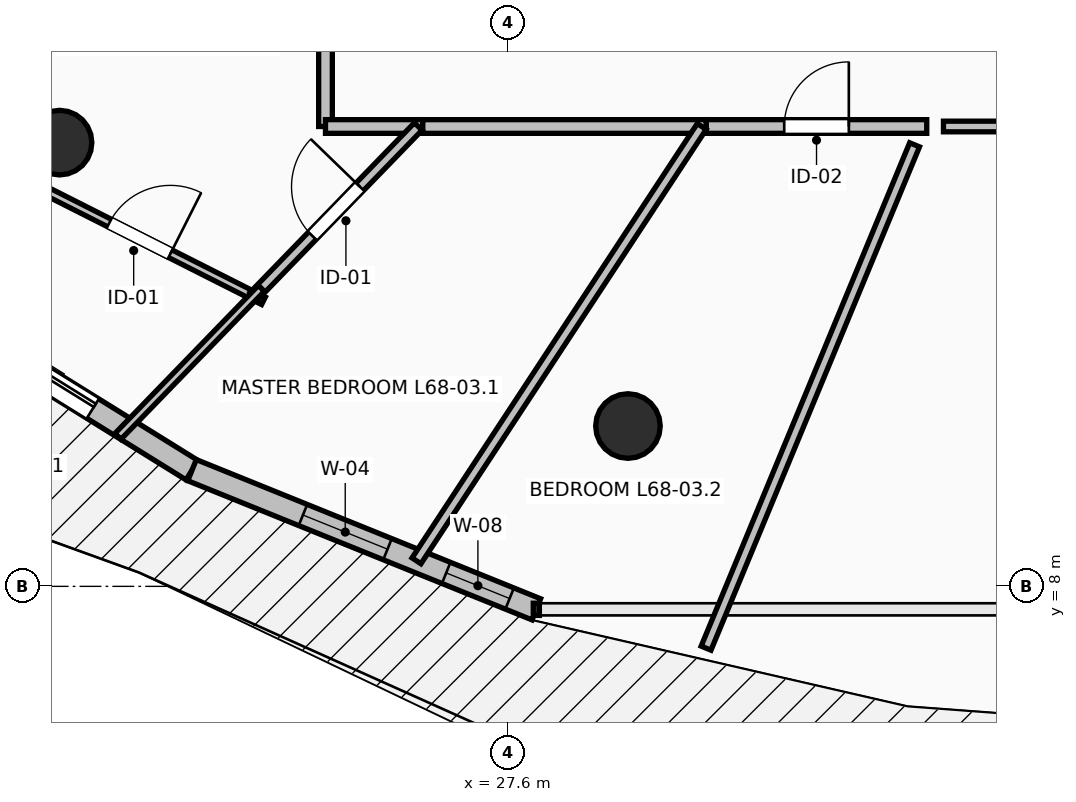
"""IFC4 building model, lengths in metres.
Left out: names, types, materials, properties, quantities, classifications, styles, units other than length and angle.
Written with IfcOpenShell. Run it as: python <this file> out.ifc"""

import sys

from ifc_helpers import new_model, si_unit, direction, frame, frame_2d, origin, origin_2d, place, context, subcontext, project, spatial, rectangle, circle, extrude, element, fill, save


model = new_model("IFC4")
c1 = context("Model", 3, precision=1e-05, world=origin(), true_north=direction((0.0, 1.0)))
c2 = subcontext(c1, "Body", "Model", "MODEL_VIEW")
j1 = project(units=[si_unit("LENGTHUNIT", "METRE"), si_unit("PLANEANGLEUNIT", "RADIAN")], contexts=[c1])
p1 = place(None, origin())
s1 = spatial("IfcSite", under=j1, at=p1, CompositionType="ELEMENT")
p2 = place(p1, origin())
s2 = spatial("IfcBuilding", under=s1, at=p2, CompositionType="ELEMENT")
p3 = place(p2, frame((0.0, 0.0, 252.0)))
s3 = spatial("IfcBuildingStorey", under=s2, at=p3, CompositionType="ELEMENT", Elevation=252.0)
for number, where, z_axis, x_axis in (
    (1, (21.701, 13.838, 0.0), (0.0, 0.0, 1.0), (-0.707, -0.707, 0.0)),
    (2, (29.179, 10.109, 0.0), (0.0, 0.0, 1.0), (-0.383, -0.924, 0.0)),
):
    element("IfcColumn", number, at=place(p3, frame(where, z_axis=z_axis, x_axis=x_axis)), inside=s3, PredefinedType="COLUMN", context=c2, shape_type="SweptSolid", body=[
        extrude(circle(Radius=0.425, at=origin_2d()), origin(), (0.0, 0.0, 1.0), 3.55),
    ])
p4 = place(p3, frame((19.474, 11.992, 0.0), z_axis=(0.0, 0.0, 1.0), x_axis=(0.849702323036, -0.527262707032, 0.0)))
e3 = element("IfcWall", 3, at=p4, inside=s3, PredefinedType="STANDARD", context=c2, shape_type="SweptSolid", body=[
    extrude(rectangle(XDim=4.672, YDim=0.3, at=frame_2d((2.336, 0.0))), origin(), (0.0, 0.0, 1.0), 3.29),
])
p5 = place(p4, frame((1.536, 0.0, 0.0)))
e4 = element("IfcOpeningElement", 4, at=p5, cuts=e3, PredefinedType="OPENING", context=c2, shape_type="SweptSolid", body=[
    extrude(rectangle(XDim=1.6, YDim=2.3, at=frame_2d((0.8, 1.15))), frame((0.0, 0.165, 0.0), z_axis=(0.0, -1.0, 0.0), x_axis=(1.0, 0.0, 0.0)), (0.0, 0.0, 1.0), 0.33),
])
p6 = place(p3, frame((23.444, 9.529, 0.0), z_axis=(0.0, 0.0, 1.0), x_axis=(0.927147375511, -0.374696869594, 0.0)))
e5 = element("IfcWall", 5, at=p6, inside=s3, PredefinedType="STANDARD", context=c2, shape_type="SweptSolid", body=[
    extrude(rectangle(XDim=4.885, YDim=0.3, at=frame_2d((2.443, 0.0))), origin(), (0.0, 0.0, 1.0), 3.29),
])
p7 = place(p6, frame((1.574, 0.0, 0.85)))
e6 = element("IfcOpeningElement", 6, at=p7, cuts=e5, PredefinedType="OPENING", context=c2, shape_type="SweptSolid", body=[
    extrude(rectangle(XDim=1.2, YDim=1.95, at=frame_2d((0.6, 0.975))), frame((0.0, 0.165, 0.0), z_axis=(0.0, -1.0, 0.0), x_axis=(1.0, 0.0, 0.0)), (0.0, 0.0, 1.0), 0.33),
])
p8 = place(p6, frame((3.606, 0.0, 0.85)))
e7 = element("IfcOpeningElement", 7, at=p8, cuts=e5, PredefinedType="OPENING", context=c2, shape_type="SweptSolid", body=[
    extrude(rectangle(XDim=0.9, YDim=1.8, at=frame_2d((0.45, 0.9))), frame((0.0, 0.165, 0.0), z_axis=(0.0, -1.0, 0.0), x_axis=(1.0, 0.0, 0.0)), (0.0, 0.0, 1.0), 0.33),
])
p9 = place(p3, frame((25.2, 17.812, 0.0), z_axis=(0.0, 0.0, 1.0), x_axis=(0.0, -1.0, 0.0)))
e8 = element("IfcWall", 8, at=p9, inside=s3, PredefinedType="PARTITIONING", context=c2, shape_type="SweptSolid", body=[
    extrude(rectangle(XDim=3.762, YDim=0.18, at=frame_2d((1.881, 0.0))), origin(), (0.0, 0.0, 1.0), 2.482),
])
p10 = place(p9, frame((1.381, 0.0, 0.0)))
e9 = element("IfcOpeningElement", 9, at=p10, cuts=e8, PredefinedType="OPENING", context=c2, shape_type="SweptSolid", body=[
    extrude(rectangle(XDim=1.0, YDim=2.15, at=frame_2d((0.5, 1.075))), frame((0.0, 0.105, 0.0), z_axis=(0.0, -1.0, 0.0), x_axis=(1.0, 0.0, 0.0)), (0.0, 0.0, 1.0), 0.21),
])
p11 = place(p3, frame((25.2, 14.05, 0.0), z_axis=(0.0, 0.0, 1.0), x_axis=(1.0, 0.0, 0.0)))
e10 = element("IfcWall", 10, at=p11, inside=s3, PredefinedType="PARTITIONING", context=c2, shape_type="SweptSolid", body=[
    extrude(rectangle(XDim=1.28, YDim=0.18, at=frame_2d((0.64, 0.0))), origin(), (0.0, 0.0, 1.0), 2.972),
])
p12 = place(p3, frame((26.48, 14.05, 0.0), z_axis=(0.0, 0.0, 1.0), x_axis=(1.0, 0.0, 0.0)))
e11 = element("IfcWall", 11, at=p12, inside=s3, PredefinedType="PARTITIONING", context=c2, shape_type="SweptSolid", body=[
    extrude(rectangle(XDim=3.73, YDim=0.18, at=frame_2d((1.865, 0.0))), origin(), (0.0, 0.0, 1.0), 2.482),
])
p13 = place(p3, frame((30.21, 14.05, 0.0), z_axis=(0.0, 0.0, 1.0), x_axis=(1.0, 0.0, 0.0)))
e12 = element("IfcWall", 12, at=p13, inside=s3, PredefinedType="PARTITIONING", context=c2, shape_type="SweptSolid", body=[
    extrude(rectangle(XDim=2.9, YDim=0.18, at=frame_2d((1.45, 0.0))), origin(), (0.0, 0.0, 1.0), 3.29),
])
p14 = place(p13, frame((1.025, 0.0, 0.0)))
e13 = element("IfcOpeningElement", 13, at=p14, cuts=e12, PredefinedType="OPENING", context=c2, shape_type="SweptSolid", body=[
    extrude(rectangle(XDim=0.85, YDim=2.1, at=frame_2d((0.425, 1.05))), frame((0.0, 0.105, 0.0), z_axis=(0.0, -1.0, 0.0), x_axis=(1.0, 0.0, 0.0)), (0.0, 0.0, 1.0), 0.21),
])
p15 = place(p3, frame((21.131, 13.4, 0.0), z_axis=(0.0, 0.0, 1.0), x_axis=(0.892570631547, -0.450907604394, 0.0)))
e14 = element("IfcWall", 14, at=p15, inside=s3, PredefinedType="PARTITIONING", context=c2, shape_type="SweptSolid", body=[
    extrude(rectangle(XDim=3.645, YDim=0.11, at=frame_2d((1.822, 0.0))), origin(), (0.0, 0.0, 1.0), 3.29),
])
p16 = place(p15, frame((1.372, 0.0, 0.0)))
e15 = element("IfcOpeningElement", 15, at=p16, cuts=e14, PredefinedType="OPENING", context=c2, shape_type="SweptSolid", body=[
    extrude(rectangle(XDim=0.9, YDim=2.1, at=frame_2d((0.45, 1.05))), frame((0.0, 0.07, 0.0), z_axis=(0.0, -1.0, 0.0), x_axis=(1.0, 0.0, 0.0)), (0.0, 0.0, 1.0), 0.14),
])
p17 = place(p3, frame((24.259, 11.82, 0.0), z_axis=(0.0, 0.0, 1.0), x_axis=(0.695894072482, 0.718144442215, 0.0)))
e16 = element("IfcWall", 16, at=p17, inside=s3, PredefinedType="PARTITIONING", context=c2, shape_type="SweptSolid", body=[
    extrude(rectangle(XDim=3.105, YDim=0.14, at=frame_2d((1.553, 0.0))), origin(), (0.0, 0.0, 1.0), 2.874),
])
p18 = place(p17, frame((1.103, 0.0, 0.0)))
e17 = element("IfcOpeningElement", 17, at=p18, cuts=e16, PredefinedType="OPENING", context=c2, shape_type="SweptSolid", body=[
    extrude(rectangle(XDim=0.9, YDim=2.1, at=frame_2d((0.45, 1.05))), frame((0.0, 0.085, 0.0), z_axis=(0.0, -1.0, 0.0), x_axis=(1.0, 0.0, 0.0)), (0.0, 0.0, 1.0), 0.17),
])
p19 = place(p3, frame((22.469, 9.973, 0.0), z_axis=(0.0, 0.0, 1.0), x_axis=(0.695944713466, 0.718095366786, 0.0)))
e18 = element("IfcWall", 18, at=p19, inside=s3, PredefinedType="PARTITIONING", context=c2, shape_type="SweptSolid", body=[
    extrude(rectangle(XDim=2.711, YDim=0.11, at=frame_2d((1.356, 0.0))), origin(), (0.0, 0.0, 1.0), 3.29),
])
p20 = place(p3, frame((26.397, 8.336, 0.0), z_axis=(0.0, 0.0, 1.0), x_axis=(0.548967647923, 0.835843598728, 0.0)))
e19 = element("IfcWall", 19, at=p20, inside=s3, PredefinedType="PARTITIONING", context=c2, shape_type="SweptSolid", body=[
    extrude(rectangle(XDim=6.836, YDim=0.14, at=frame_2d((3.418, 0.0))), origin(), (0.0, 0.0, 1.0), 2.482),
])
p21 = place(p3, frame((33.33, 14.05, 0.0), z_axis=(0.0, 0.0, 1.0), x_axis=(1.0, 0.0, 0.0)))
e20 = element("IfcWall", 20, at=p21, inside=s3, PredefinedType="PARTITIONING", context=c2, shape_type="SweptSolid", body=[
    extrude(rectangle(XDim=3.22, YDim=0.14, at=frame_2d((1.61, 0.0))), origin(), (0.0, 0.0, 1.0), 3.29),
])
p22 = place(p3, frame((30.207, 7.187, 0.0), z_axis=(0.0, 0.0, 1.0), x_axis=(0.382679691634, 0.923881081964, 0.0)))
e21 = element("IfcWall", 21, at=p22, inside=s3, PredefinedType="PARTITIONING", context=c2, shape_type="SweptSolid", body=[
    extrude(rectangle(XDim=7.168, YDim=0.14, at=frame_2d((3.584, 0.0))), origin(), (0.0, 0.0, 1.0), 2.874),
])
p23 = place(p5, origin())
e22 = element("IfcDoor", 22, at=p23, inside=s3, OperationType="SLIDING_TO_LEFT", PredefinedType="DOOR", context=c2, shape_type="SweptSolid", body=[
    extrude(rectangle(XDim=1.6, YDim=2.3, at=frame_2d((0.8, 1.15))), frame((0.0, 0.025, 0.0), z_axis=(0.0, -1.0, 0.0), x_axis=(1.0, 0.0, 0.0)), (0.0, 0.0, 1.0), 0.05),
])
fill(e4, e22)
p24 = place(p7, origin())
e23 = element("IfcWindow", 23, at=p24, inside=s3, PartitioningType="SINGLE_PANEL", PredefinedType="WINDOW", context=c2, shape_type="SweptSolid", body=[
    extrude(rectangle(XDim=1.2, YDim=1.95, at=frame_2d((0.6, 0.975))), frame((0.0, 0.03, 0.0), z_axis=(0.0, -1.0, 0.0), x_axis=(1.0, 0.0, 0.0)), (0.0, 0.0, 1.0), 0.06),
])
fill(e6, e23)
p25 = place(p8, origin())
e24 = element("IfcWindow", 24, at=p25, inside=s3, PartitioningType="SINGLE_PANEL", PredefinedType="WINDOW", context=c2, shape_type="SweptSolid", body=[
    extrude(rectangle(XDim=0.9, YDim=1.8, at=frame_2d((0.45, 0.9))), frame((0.0, 0.03, 0.0), z_axis=(0.0, -1.0, 0.0), x_axis=(1.0, 0.0, 0.0)), (0.0, 0.0, 1.0), 0.06),
])
fill(e7, e24)
p26 = place(p16, origin())
e25 = element("IfcDoor", 25, at=p26, inside=s3, OperationType="SINGLE_SWING_RIGHT", PredefinedType="DOOR", context=c2, shape_type="SweptSolid", body=[
    extrude(rectangle(XDim=0.9, YDim=2.1, at=frame_2d((0.45, 1.05))), frame((0.0, 0.025, 0.0), z_axis=(0.0, -1.0, 0.0), x_axis=(1.0, 0.0, 0.0)), (0.0, 0.0, 1.0), 0.05),
])
fill(e15, e25)
p27 = place(p18, origin())
e26 = element("IfcDoor", 26, at=p27, inside=s3, OperationType="SINGLE_SWING_RIGHT", PredefinedType="DOOR", context=c2, shape_type="SweptSolid", body=[
    extrude(rectangle(XDim=0.9, YDim=2.1, at=frame_2d((0.45, 1.05))), frame((0.0, 0.025, 0.0), z_axis=(0.0, -1.0, 0.0), x_axis=(1.0, 0.0, 0.0)), (0.0, 0.0, 1.0), 0.05),
])
fill(e17, e26)
p28 = place(p14, origin())
e27 = element("IfcDoor", 27, at=p28, inside=s3, OperationType="SINGLE_SWING_RIGHT", PredefinedType="DOOR", context=c2, shape_type="SweptSolid", body=[
    extrude(rectangle(XDim=0.85, YDim=2.1, at=frame_2d((0.425, 1.05))), frame((0.0, 0.025, 0.0), z_axis=(0.0, -1.0, 0.0), x_axis=(1.0, 0.0, 0.0)), (0.0, 0.0, 1.0), 0.05),
])
fill(e13, e27)
save(model, sys.argv[1])
